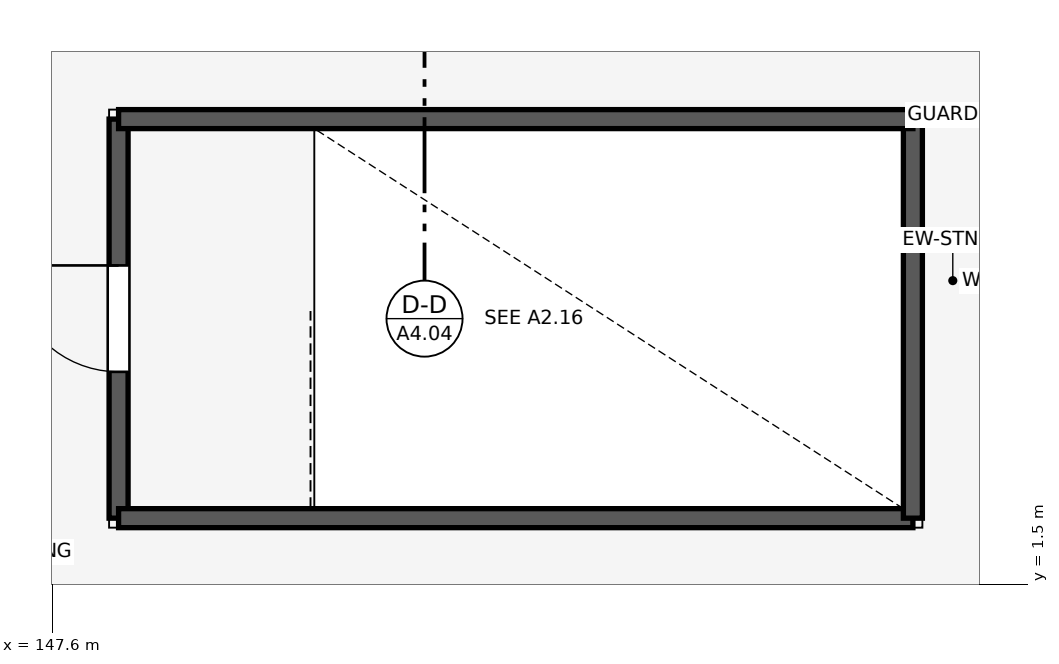
"""IFC4 building model, lengths in metres.
Left out: names, types, materials, properties, quantities, classifications, styles, units other than length and angle.
Written with IfcOpenShell. Run it as: python <this file> out.ifc"""

import sys

from ifc_helpers import new_model, si_unit, direction, frame, frame_2d, origin, place, context, subcontext, project, spatial, rectangle, extrude, element, fill, save


model = new_model("IFC4")
c1 = context("Model", 3, precision=1e-05, world=origin(), true_north=direction((0.0, 1.0)))
c2 = subcontext(c1, "Body", "Model", "MODEL_VIEW")
j1 = project(units=[si_unit("LENGTHUNIT", "METRE"), si_unit("PLANEANGLEUNIT", "RADIAN")], contexts=[c1])
p1 = place(None, origin())
s1 = spatial("IfcSite", under=j1, at=p1, CompositionType="ELEMENT")
p2 = place(p1, origin())
s2 = spatial("IfcBuilding", under=s1, at=p2, CompositionType="ELEMENT")
p3 = place(p2, frame((0.0, 0.0, 10.6)))
s3 = spatial("IfcBuildingStorey", under=s2, at=p3, CompositionType="ELEMENT", Elevation=10.6)
p4 = place(p3, frame((148.475, 7.625, 0.0), z_axis=(0.0, 0.0, 1.0), x_axis=(0.0, -1.0, 0.0)))
e1 = element("IfcWall", 1, at=p4, inside=s3, PredefinedType="SHEAR", context=c2, shape_type="SweptSolid", body=[
    extrude(rectangle(XDim=5.25, YDim=0.25, at=frame_2d((2.625, 0.0))), origin(), (0.0, 0.0, 1.0), 3.2),
])
p5 = place(p4, frame((1.925, 0.0, 0.0)))
e2 = element("IfcOpeningElement", 2, at=p5, cuts=e1, PredefinedType="OPENING", context=c2, shape_type="SweptSolid", body=[
    extrude(rectangle(XDim=1.4, YDim=2.2, at=frame_2d((0.7, 1.1))), frame((0.0, 0.135, 0.0), z_axis=(0.0, -1.0, 0.0), x_axis=(1.0, 0.0, 0.0)), (0.0, 0.0, 1.0), 0.27),
])
p6 = place(p3, frame((148.475, 2.375, 0.0), z_axis=(0.0, 0.0, 1.0), x_axis=(1.0, 0.0, 0.0)))
e3 = element("IfcWall", 3, at=p6, inside=s3, PredefinedType="SHEAR", context=c2, shape_type="SweptSolid", body=[
    extrude(rectangle(XDim=10.45, YDim=0.25, at=frame_2d((5.225, 0.0))), origin(), (0.0, 0.0, 1.0), 3.2),
])
p7 = place(p3, frame((158.925, 2.375, 0.0), z_axis=(0.0, 0.0, 1.0), x_axis=(0.0, 1.0, 0.0)))
e4 = element("IfcWall", 4, at=p7, inside=s3, PredefinedType="SHEAR", context=c2, shape_type="SweptSolid", body=[
    extrude(rectangle(XDim=5.25, YDim=0.25, at=frame_2d((2.625, 0.0))), origin(), (0.0, 0.0, 1.0), 3.2),
])
p8 = place(p3, frame((158.925, 7.625, 0.0), z_axis=(0.0, 0.0, 1.0), x_axis=(-1.0, 0.0, 0.0)))
e5 = element("IfcWall", 5, at=p8, inside=s3, PredefinedType="SHEAR", context=c2, shape_type="SweptSolid", body=[
    extrude(rectangle(XDim=10.45, YDim=0.25, at=frame_2d((5.225, 0.0))), origin(), (0.0, 0.0, 1.0), 3.2),
])
p9 = place(p5, frame((1.4, 0.0, 0.0), z_axis=(0.0, 0.0, 1.0), x_axis=(-1.0, 0.0, 0.0)))
e6 = element("IfcDoor", 6, at=p9, inside=s3, OperationType="SINGLE_SWING_RIGHT", PredefinedType="DOOR", context=c2, shape_type="SweptSolid", body=[
    extrude(rectangle(XDim=1.4, YDim=2.2, at=frame_2d((0.7, 1.1))), frame((0.0, 0.025, 0.0), z_axis=(0.0, -1.0, 0.0), x_axis=(1.0, 0.0, 0.0)), (0.0, 0.0, 1.0), 0.05),
])
fill(e2, e6)
save(model, sys.argv[1])
